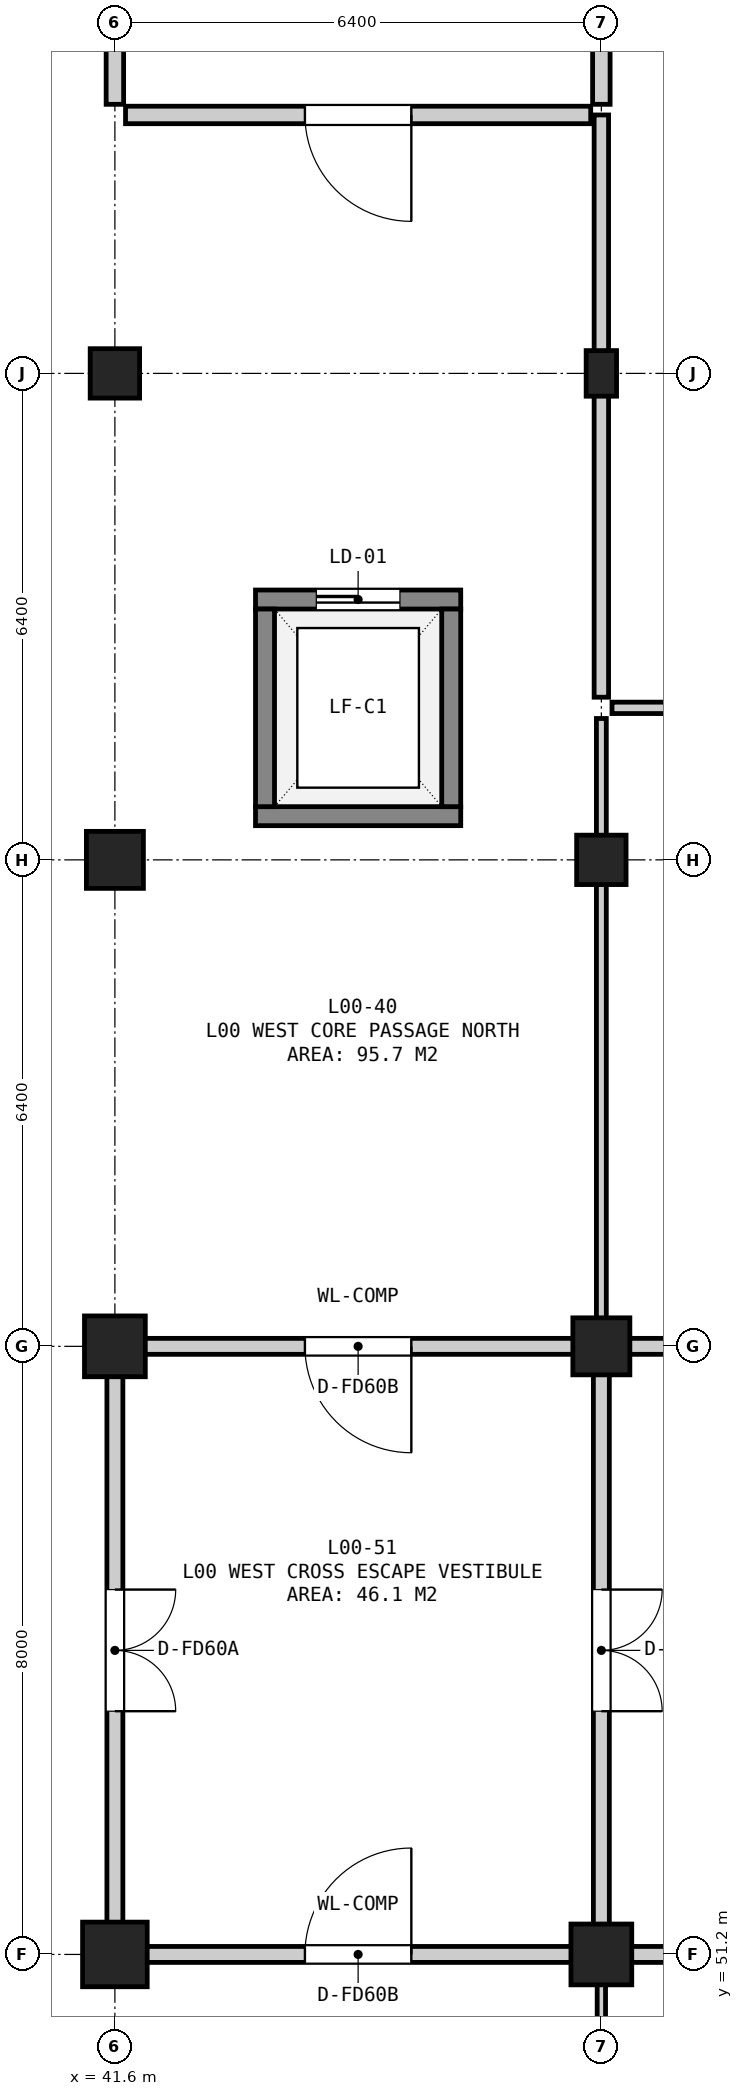
"""IFC4 building model, lengths in metres.
Left out: names, types, materials, properties, quantities, classifications, styles, units other than length and angle.
Written with IfcOpenShell. Run it as: python <this file> out.ifc"""

import sys

from ifc_helpers import new_model, si_unit, direction, frame, frame_2d, origin, origin_2d, place, context, subcontext, project, spatial, rectangle, extrude, element, fill, save


model = new_model("IFC4")
c1 = context("Model", 3, precision=1e-05, world=origin(), true_north=direction((0.0, 1.0)))
c2 = subcontext(c1, "Body", "Model", "MODEL_VIEW")
j1 = project(units=[si_unit("LENGTHUNIT", "METRE"), si_unit("PLANEANGLEUNIT", "RADIAN")], contexts=[c1])
p1 = place(None, origin())
s1 = spatial("IfcSite", under=j1, at=p1, CompositionType="ELEMENT")
p2 = place(p1, origin())
s2 = spatial("IfcBuilding", under=s1, at=p2, CompositionType="ELEMENT")
p3 = place(p2, origin())
s3 = spatial("IfcBuildingStorey", under=s2, at=p3, CompositionType="ELEMENT", Elevation=0.0)
p4 = place(p3, frame((41.6, 51.2, 0.0), z_axis=(0.0, 0.0, 1.0), x_axis=(1.0, 0.0, 0.0)))
e1 = element("IfcColumn", 1, at=p4, inside=s3, PredefinedType="COLUMN", context=c2, shape_type="SweptSolid", body=[
    extrude(rectangle(XDim=0.85, YDim=0.85, at=origin_2d()), origin(), (0.0, 0.0, 1.0), 5.4),
])
p5 = place(p3, frame((41.6, 59.2, 0.0), z_axis=(0.0, 0.0, 1.0), x_axis=(1.0, 0.0, 0.0)))
e2 = element("IfcColumn", 2, at=p5, inside=s3, PredefinedType="COLUMN", context=c2, shape_type="SweptSolid", body=[
    extrude(rectangle(XDim=0.8, YDim=0.8, at=origin_2d()), origin(), (0.0, 0.0, 1.0), 5.4),
])
p6 = place(p3, frame((41.6, 65.6, 0.0), z_axis=(0.0, 0.0, 1.0), x_axis=(1.0, 0.0, 0.0)))
e3 = element("IfcColumn", 3, at=p6, inside=s3, PredefinedType="COLUMN", context=c2, shape_type="SweptSolid", body=[
    extrude(rectangle(XDim=0.75, YDim=0.75, at=origin_2d()), origin(), (0.0, 0.0, 1.0), 5.4),
])
p7 = place(p3, frame((41.6, 72.0, 0.0), z_axis=(0.0, 0.0, 1.0), x_axis=(1.0, 0.0, 0.0)))
e4 = element("IfcColumn", 4, at=p7, inside=s3, PredefinedType="COLUMN", context=c2, shape_type="SweptSolid", body=[
    extrude(rectangle(XDim=0.65, YDim=0.65, at=origin_2d()), origin(), (0.0, 0.0, 1.0), 5.4),
])
p8 = place(p3, frame((48.0, 51.2, 0.0), z_axis=(0.0, 0.0, 1.0), x_axis=(1.0, 0.0, 0.0)))
e5 = element("IfcColumn", 5, at=p8, inside=s3, PredefinedType="COLUMN", context=c2, shape_type="SweptSolid", body=[
    extrude(rectangle(XDim=0.8, YDim=0.8, at=origin_2d()), origin(), (0.0, 0.0, 1.0), 5.4),
])
p9 = place(p3, frame((48.0, 59.2, 0.0), z_axis=(0.0, 0.0, 1.0), x_axis=(1.0, 0.0, 0.0)))
e6 = element("IfcColumn", 6, at=p9, inside=s3, PredefinedType="COLUMN", context=c2, shape_type="SweptSolid", body=[
    extrude(rectangle(XDim=0.75, YDim=0.75, at=origin_2d()), origin(), (0.0, 0.0, 1.0), 5.4),
])
p10 = place(p3, frame((48.0, 65.6, 0.0), z_axis=(0.0, 0.0, 1.0), x_axis=(1.0, 0.0, 0.0)))
e7 = element("IfcColumn", 7, at=p10, inside=s3, PredefinedType="COLUMN", context=c2, shape_type="SweptSolid", body=[
    extrude(rectangle(XDim=0.65, YDim=0.65, at=origin_2d()), origin(), (0.0, 0.0, 1.0), 5.4),
])
p11 = place(p3, frame((48.0, 72.0, 0.0), z_axis=(0.0, 0.0, 1.0), x_axis=(1.0, 0.0, 0.0)))
e8 = element("IfcColumn", 8, at=p11, inside=s3, PredefinedType="COLUMN", context=c2, shape_type="SweptSolid", body=[
    extrude(rectangle(XDim=0.4, YDim=0.6, at=origin_2d()), origin(), (0.0, 0.0, 1.0), 5.4),
])
p12 = place(p3, frame((43.45, 66.175, 0.0), z_axis=(0.0, 0.0, 1.0), x_axis=(1.0, 0.0, 0.0)))
e9 = element("IfcWall", 9, at=p12, inside=s3, PredefinedType="SHEAR", context=c2, shape_type="SweptSolid", body=[
    extrude(rectangle(XDim=2.7, YDim=0.25, at=frame_2d((1.35, 0.0))), origin(), (0.0, 0.0, 1.0), 5.08),
])
p13 = place(p3, frame((43.45, 69.025, 0.0), z_axis=(0.0, 0.0, 1.0), x_axis=(1.0, 0.0, 0.0)))
e10 = element("IfcWall", 10, at=p13, inside=s3, PredefinedType="SHEAR", context=c2, shape_type="SweptSolid", body=[
    extrude(rectangle(XDim=2.7, YDim=0.25, at=frame_2d((1.35, 0.0))), origin(), (0.0, 0.0, 1.0), 5.08),
])
p14 = place(p13, frame((0.8, 0.0, 0.0)))
e11 = element("IfcOpeningElement", 11, at=p14, cuts=e10, PredefinedType="OPENING", context=c2, shape_type="SweptSolid", body=[
    extrude(rectangle(XDim=1.1, YDim=2.15, at=frame_2d((0.55, 1.075))), frame((0.0, 0.137, 0.0), z_axis=(0.0, -1.0, 0.0), x_axis=(1.0, 0.0, 0.0)), (0.0, 0.0, 1.0), 0.274),
])
for number, where, z_axis, x_axis in (
    (12, (43.575, 66.3, 0.0), (0.0, 0.0, 1.0), (0.0, 1.0, 0.0)),
    (13, (46.025, 66.3, 0.0), (0.0, 0.0, 1.0), (0.0, 1.0, 0.0)),
):
    element("IfcWall", number, at=place(p3, frame(where, z_axis=z_axis, x_axis=x_axis)), inside=s3, PredefinedType="SHEAR", context=c2, shape_type="SweptSolid", body=[
        extrude(rectangle(XDim=2.6, YDim=0.25, at=frame_2d((1.3, 0.0))), origin(), (0.0, 0.0, 1.0), 5.08),
    ])
p15 = place(p3, frame((41.74, 75.4, 0.0), z_axis=(0.0, 0.0, 1.0), x_axis=(1.0, 0.0, 0.0)))
e14 = element("IfcWall", 14, at=p15, inside=s3, PredefinedType="SOLIDWALL", context=c2, shape_type="SweptSolid", body=[
    extrude(rectangle(XDim=6.12, YDim=0.23, at=frame_2d((3.06, 0.0))), origin(), (0.0, 0.0, 1.0), 5.08),
])
p16 = place(p15, frame((2.36, 0.0, 0.0)))
e15 = element("IfcOpeningElement", 15, at=p16, cuts=e14, PredefinedType="OPENING", context=c2, shape_type="SweptSolid", body=[
    extrude(rectangle(XDim=1.4, YDim=2.2, at=frame_2d((0.7, 1.1))), frame((0.0, 0.127, 0.0), z_axis=(0.0, -1.0, 0.0), x_axis=(1.0, 0.0, 0.0)), (0.0, 0.0, 1.0), 0.254),
])
p17 = place(p3, frame((41.6, 75.54, 0.0), z_axis=(0.0, 0.0, 1.0), x_axis=(0.0, 1.0, 0.0)))
e16 = element("IfcWall", 16, at=p17, inside=s3, PredefinedType="SOLIDWALL", context=c2, shape_type="SweptSolid", body=[
    extrude(rectangle(XDim=3.52, YDim=0.23, at=frame_2d((1.76, 0.0))), origin(), (0.0, 0.0, 1.0), 4.575),
])
p18 = place(p17, frame((1.06, 0.0, 0.0)))
e17 = element("IfcOpeningElement", 17, at=p18, cuts=e16, PredefinedType="OPENING", context=c2, shape_type="SweptSolid", body=[
    extrude(rectangle(XDim=1.4, YDim=2.2, at=frame_2d((0.7, 1.1))), frame((0.0, 0.127, 0.0), z_axis=(0.0, -1.0, 0.0), x_axis=(1.0, 0.0, 0.0)), (0.0, 0.0, 1.0), 0.254),
])
p19 = place(p3, frame((48.0, 75.54, 0.0), z_axis=(0.0, 0.0, 1.0), x_axis=(0.0, 1.0, 0.0)))
e18 = element("IfcWall", 18, at=p19, inside=s3, PredefinedType="SOLIDWALL", context=c2, shape_type="SweptSolid", body=[
    extrude(rectangle(XDim=3.52, YDim=0.23, at=frame_2d((1.76, 0.0))), origin(), (0.0, 0.0, 1.0), 4.625),
])
p20 = place(p3, frame((41.74, 51.2, 0.0), z_axis=(0.0, 0.0, 1.0), x_axis=(1.0, 0.0, 0.0)))
e19 = element("IfcWall", 19, at=p20, inside=s3, PredefinedType="SOLIDWALL", context=c2, shape_type="SweptSolid", body=[
    extrude(rectangle(XDim=6.12, YDim=0.21, at=frame_2d((3.06, 0.0))), origin(), (0.0, 0.0, 1.0), 4.425),
])
p21 = place(p20, frame((2.36, 0.0, 0.0)))
e20 = element("IfcOpeningElement", 20, at=p21, cuts=e19, PredefinedType="OPENING", context=c2, shape_type="SweptSolid", body=[
    extrude(rectangle(XDim=1.4, YDim=2.2, at=frame_2d((0.7, 1.1))), frame((0.0, 0.117, 0.0), z_axis=(0.0, -1.0, 0.0), x_axis=(1.0, 0.0, 0.0)), (0.0, 0.0, 1.0), 0.234),
])
p22 = place(p3, frame((41.74, 59.2, 0.0), z_axis=(0.0, 0.0, 1.0), x_axis=(1.0, 0.0, 0.0)))
e21 = element("IfcWall", 21, at=p22, inside=s3, PredefinedType="SOLIDWALL", context=c2, shape_type="SweptSolid", body=[
    extrude(rectangle(XDim=6.12, YDim=0.21, at=frame_2d((3.06, 0.0))), origin(), (0.0, 0.0, 1.0), 4.525),
])
p23 = place(p22, frame((2.36, 0.0, 0.0)))
e22 = element("IfcOpeningElement", 22, at=p23, cuts=e21, PredefinedType="OPENING", context=c2, shape_type="SweptSolid", body=[
    extrude(rectangle(XDim=1.4, YDim=2.2, at=frame_2d((0.7, 1.1))), frame((0.0, 0.117, 0.0), z_axis=(0.0, -1.0, 0.0), x_axis=(1.0, 0.0, 0.0)), (0.0, 0.0, 1.0), 0.234),
])
p24 = place(p3, frame((41.6, 51.34, 0.0), z_axis=(0.0, 0.0, 1.0), x_axis=(0.0, 1.0, 0.0)))
e23 = element("IfcWall", 23, at=p24, inside=s3, PredefinedType="SOLIDWALL", context=c2, shape_type="SweptSolid", body=[
    extrude(rectangle(XDim=7.72, YDim=0.21, at=frame_2d((3.86, 0.0))), origin(), (0.0, 0.0, 1.0), 4.575),
])
p25 = place(p24, frame((3.06, 0.0, 0.0)))
e24 = element("IfcOpeningElement", 24, at=p25, cuts=e23, PredefinedType="OPENING", context=c2, shape_type="SweptSolid", body=[
    extrude(rectangle(XDim=1.6, YDim=2.2, at=frame_2d((0.8, 1.1))), frame((0.0, 0.117, 0.0), z_axis=(0.0, -1.0, 0.0), x_axis=(1.0, 0.0, 0.0)), (0.0, 0.0, 1.0), 0.234),
])
p26 = place(p3, frame((48.0, 51.34, 0.0), z_axis=(0.0, 0.0, 1.0), x_axis=(0.0, 1.0, 0.0)))
e25 = element("IfcWall", 25, at=p26, inside=s3, PredefinedType="SOLIDWALL", context=c2, shape_type="SweptSolid", body=[
    extrude(rectangle(XDim=7.72, YDim=0.21, at=frame_2d((3.86, 0.0))), origin(), (0.0, 0.0, 1.0), 4.575),
])
p27 = place(p26, frame((3.06, 0.0, 0.0)))
e26 = element("IfcOpeningElement", 26, at=p27, cuts=e25, PredefinedType="OPENING", context=c2, shape_type="SweptSolid", body=[
    extrude(rectangle(XDim=1.6, YDim=2.2, at=frame_2d((0.8, 1.1))), frame((0.0, 0.117, 0.0), z_axis=(0.0, -1.0, 0.0), x_axis=(1.0, 0.0, 0.0)), (0.0, 0.0, 1.0), 0.234),
])
p28 = place(p3, frame((48.14, 51.2, 0.0), z_axis=(0.0, 0.0, 1.0), x_axis=(1.0, 0.0, 0.0)))
e27 = element("IfcWall", 27, at=p28, inside=s3, PredefinedType="SOLIDWALL", context=c2, shape_type="SweptSolid", body=[
    extrude(rectangle(XDim=6.26, YDim=0.21, at=frame_2d((3.13, 0.0))), origin(), (0.0, 0.0, 1.0), 4.475),
])
p29 = place(p28, frame((2.51, 0.0, 0.0)))
e28 = element("IfcOpeningElement", 28, at=p29, cuts=e27, PredefinedType="OPENING", context=c2, shape_type="SweptSolid", body=[
    extrude(rectangle(XDim=1.1, YDim=2.15, at=frame_2d((0.55, 1.075))), frame((0.0, 0.117, 0.0), z_axis=(0.0, -1.0, 0.0), x_axis=(1.0, 0.0, 0.0)), (0.0, 0.0, 1.0), 0.234),
])
p30 = place(p3, frame((48.14, 59.2, 0.0), z_axis=(0.0, 0.0, 1.0), x_axis=(1.0, 0.0, 0.0)))
e29 = element("IfcWall", 29, at=p30, inside=s3, PredefinedType="SOLIDWALL", context=c2, shape_type="SweptSolid", body=[
    extrude(rectangle(XDim=14.12, YDim=0.21, at=frame_2d((7.06, 0.0))), origin(), (0.0, 0.0, 1.0), 4.575),
])
p31 = place(p30, frame((2.585, 0.0, 0.0)))
e30 = element("IfcOpeningElement", 30, at=p31, cuts=e29, PredefinedType="OPENING", context=c2, shape_type="SweptSolid", body=[
    extrude(rectangle(XDim=0.95, YDim=2.15, at=frame_2d((0.475, 1.075))), frame((0.0, 0.117, 0.0), z_axis=(0.0, -1.0, 0.0), x_axis=(1.0, 0.0, 0.0)), (0.0, 0.0, 1.0), 0.234),
])
p32 = place(p30, frame((10.735, 0.0, 0.0)))
e31 = element("IfcOpeningElement", 31, at=p32, cuts=e29, PredefinedType="OPENING", context=c2, shape_type="SweptSolid", body=[
    extrude(rectangle(XDim=1.05, YDim=2.15, at=frame_2d((0.525, 1.075))), frame((0.0, 0.117, 0.0), z_axis=(0.0, -1.0, 0.0), x_axis=(1.0, 0.0, 0.0)), (0.0, 0.0, 1.0), 0.234),
])
p33 = place(p3, frame((48.0, 43.34, 0.0), z_axis=(0.0, 0.0, 1.0), x_axis=(0.0, 1.0, 0.0)))
e32 = element("IfcWall", 32, at=p33, inside=s3, PredefinedType="PARTITIONING", context=c2, shape_type="SweptSolid", body=[
    extrude(rectangle(XDim=7.72, YDim=0.11, at=frame_2d((3.86, 0.0))), origin(), (0.0, 0.0, 1.0), 4.575),
])
p34 = place(p3, frame((48.14, 67.6, 0.0), z_axis=(0.0, 0.0, 1.0), x_axis=(1.0, 0.0, 0.0)))
e33 = element("IfcWall", 33, at=p34, inside=s3, PredefinedType="PARTITIONING", context=c2, shape_type="SweptSolid", body=[
    extrude(rectangle(XDim=8.12, YDim=0.15, at=frame_2d((4.06, 0.0))), origin(), (0.0, 0.0, 1.0), 5.08),
])
p35 = place(p3, frame((48.0, 59.34, 0.0), z_axis=(0.0, 0.0, 1.0), x_axis=(0.0, 1.0, 0.0)))
e34 = element("IfcWall", 34, at=p35, inside=s3, PredefinedType="PARTITIONING", context=c2, shape_type="SweptSolid", body=[
    extrude(rectangle(XDim=8.12, YDim=0.13, at=frame_2d((4.06, 0.0))), origin(), (0.0, 0.0, 1.0), 4.525),
])
p36 = place(p3, frame((48.0, 67.74, 0.0), z_axis=(0.0, 0.0, 1.0), x_axis=(0.0, 1.0, 0.0)))
e35 = element("IfcWall", 35, at=p36, inside=s3, PredefinedType="PARTITIONING", context=c2, shape_type="SweptSolid", body=[
    extrude(rectangle(XDim=7.66, YDim=0.19, at=frame_2d((3.83, 0.0))), origin(), (0.0, 0.0, 1.0), 4.575),
])
p37 = place(p14, origin())
e36 = element("IfcDoor", 36, at=p37, inside=s3, OperationType="SLIDING_TO_LEFT", PredefinedType="DOOR", context=c2, shape_type="SweptSolid", body=[
    extrude(rectangle(XDim=1.1, YDim=2.15, at=frame_2d((0.55, 1.075))), frame((0.0, 0.025, 0.0), z_axis=(0.0, -1.0, 0.0), x_axis=(1.0, 0.0, 0.0)), (0.0, 0.0, 1.0), 0.05),
])
fill(e11, e36)
p38 = place(p16, frame((1.4, 0.0, 0.0), z_axis=(0.0, 0.0, 1.0), x_axis=(-1.0, 0.0, 0.0)))
e37 = element("IfcDoor", 37, at=p38, inside=s3, OperationType="SINGLE_SWING_LEFT", PredefinedType="DOOR", context=c2, shape_type="SweptSolid", body=[
    extrude(rectangle(XDim=1.4, YDim=2.2, at=frame_2d((0.7, 1.1))), frame((0.0, 0.025, 0.0), z_axis=(0.0, -1.0, 0.0), x_axis=(1.0, 0.0, 0.0)), (0.0, 0.0, 1.0), 0.05),
])
fill(e15, e37)
p39 = place(p21, origin())
e38 = element("IfcDoor", 38, at=p39, inside=s3, OperationType="SINGLE_SWING_RIGHT", PredefinedType="DOOR", context=c2, shape_type="SweptSolid", body=[
    extrude(rectangle(XDim=1.4, YDim=2.2, at=frame_2d((0.7, 1.1))), frame((0.0, 0.025, 0.0), z_axis=(0.0, -1.0, 0.0), x_axis=(1.0, 0.0, 0.0)), (0.0, 0.0, 1.0), 0.05),
])
fill(e20, e38)
p40 = place(p23, frame((1.4, 0.0, 0.0), z_axis=(0.0, 0.0, 1.0), x_axis=(-1.0, 0.0, 0.0)))
e39 = element("IfcDoor", 39, at=p40, inside=s3, OperationType="SINGLE_SWING_LEFT", PredefinedType="DOOR", context=c2, shape_type="SweptSolid", body=[
    extrude(rectangle(XDim=1.4, YDim=2.2, at=frame_2d((0.7, 1.1))), frame((0.0, 0.025, 0.0), z_axis=(0.0, -1.0, 0.0), x_axis=(1.0, 0.0, 0.0)), (0.0, 0.0, 1.0), 0.05),
])
fill(e22, e39)
p41 = place(p25, frame((1.6, 0.0, 0.0), z_axis=(0.0, 0.0, 1.0), x_axis=(-1.0, 0.0, 0.0)))
e40 = element("IfcDoor", 40, at=p41, inside=s3, OperationType="DOUBLE_DOOR_SINGLE_SWING", PredefinedType="DOOR", context=c2, shape_type="SweptSolid", body=[
    extrude(rectangle(XDim=1.6, YDim=2.2, at=frame_2d((0.8, 1.1))), frame((0.0, 0.025, 0.0), z_axis=(0.0, -1.0, 0.0), x_axis=(1.0, 0.0, 0.0)), (0.0, 0.0, 1.0), 0.05),
])
fill(e24, e40)
p42 = place(p27, frame((1.6, 0.0, 0.0), z_axis=(0.0, 0.0, 1.0), x_axis=(-1.0, 0.0, 0.0)))
e41 = element("IfcDoor", 41, at=p42, inside=s3, OperationType="DOUBLE_DOOR_SINGLE_SWING", PredefinedType="DOOR", context=c2, shape_type="SweptSolid", body=[
    extrude(rectangle(XDim=1.6, YDim=2.2, at=frame_2d((0.8, 1.1))), frame((0.0, 0.025, 0.0), z_axis=(0.0, -1.0, 0.0), x_axis=(1.0, 0.0, 0.0)), (0.0, 0.0, 1.0), 0.05),
])
fill(e26, e41)
save(model, sys.argv[1])
